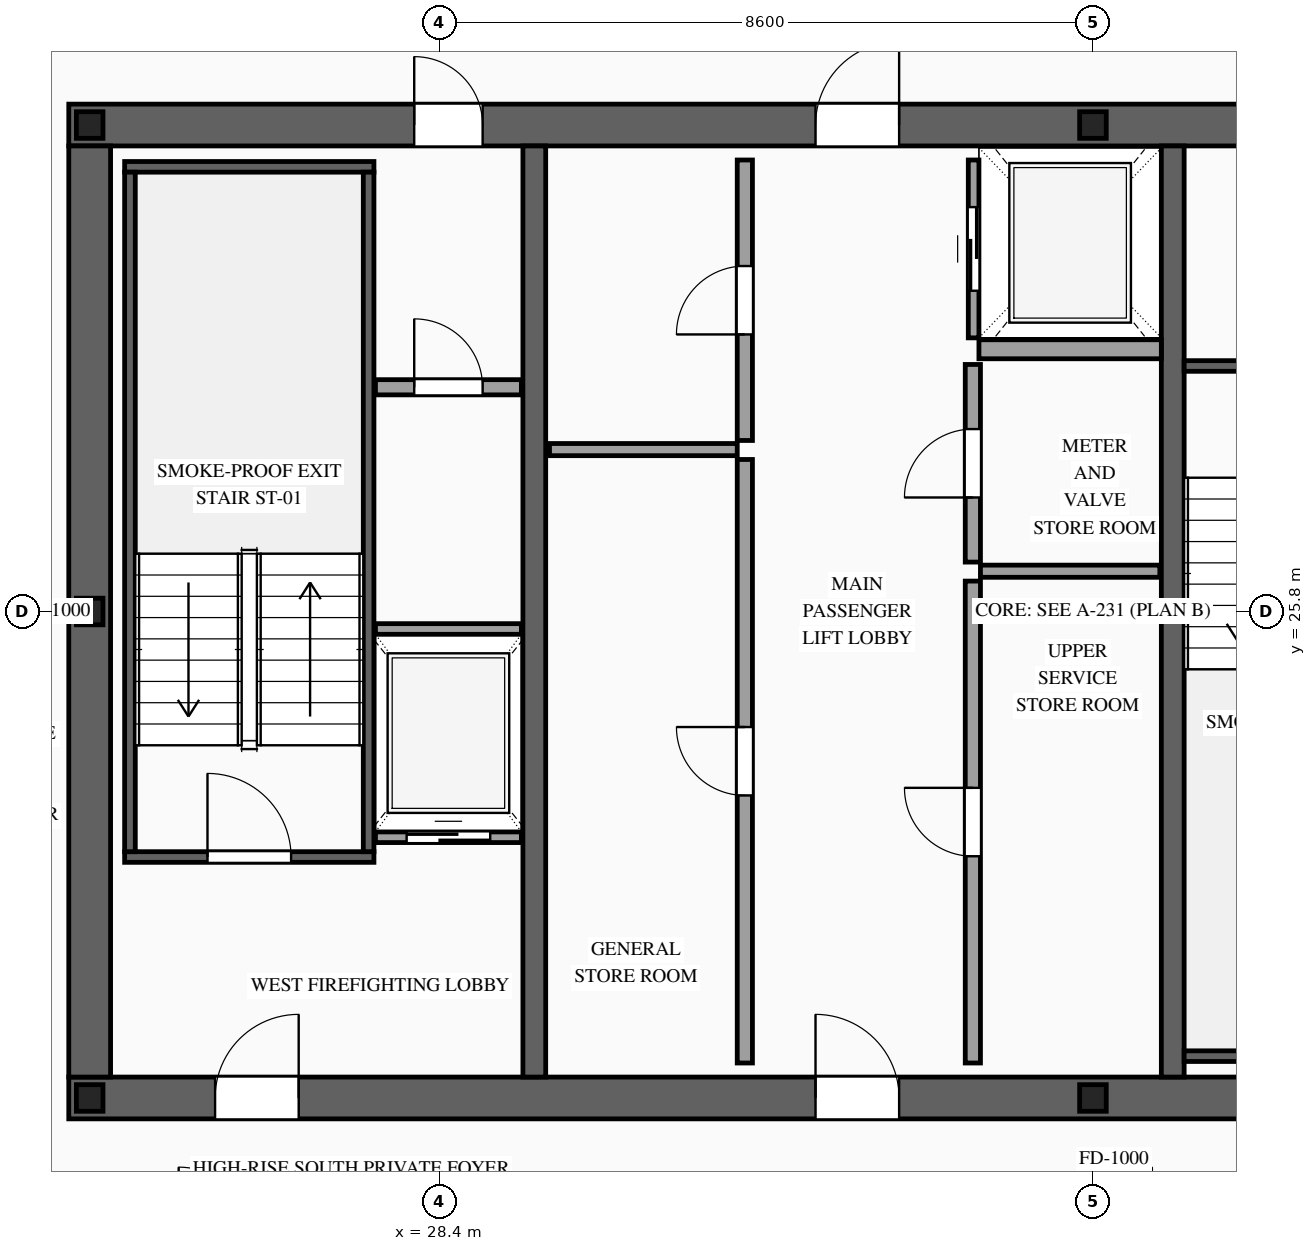
"""IFC4 building model, lengths in metres.
Left out: names, types, materials, properties, quantities, classifications, styles, units other than length and angle.
Written with IfcOpenShell. Run it as: python <this file> out.ifc"""

import sys

from ifc_helpers import new_model, si_unit, direction, frame, frame_2d, origin, origin_2d, place, context, subcontext, project, spatial, rectangle, i_section, extrude, source, transform, mapped, element, fill, save


model = new_model("IFC4")
c1 = context("Model", 3, precision=1e-05, world=origin(), true_north=direction((0.0, 1.0)))
c2 = subcontext(c1, "Body", "Model", "MODEL_VIEW")
j1 = project(units=[si_unit("LENGTHUNIT", "METRE"), si_unit("PLANEANGLEUNIT", "RADIAN")], contexts=[c1])
p1 = place(None, origin())
s1 = spatial("IfcSite", under=j1, at=p1, CompositionType="ELEMENT")
p2 = place(p1, origin())
s2 = spatial("IfcBuilding", under=s1, at=p2, CompositionType="ELEMENT")
p3 = place(p2, frame((0.0, 0.0, 268.1)))
s3 = spatial("IfcBuildingStorey", under=s2, at=p3, CompositionType="ELEMENT", Elevation=268.1)
p4 = place(p3, frame((23.525, 19.4, 0.0), z_axis=(0.0, 0.0, 1.0), x_axis=(1.0, 0.0, 0.0)))
e1 = element("IfcWall", 1, at=p4, inside=s3, PredefinedType="SHEAR", context=c2, shape_type="SweptSolid", body=[
    extrude(rectangle(XDim=26.95, YDim=0.55, at=frame_2d((13.475, 0.0))), origin(), (0.0, 0.0, 1.0), 3.5),
])
p5 = place(p4, frame((1.925, 0.0, 0.0)))
e2 = element("IfcOpeningElement", 2, at=p5, cuts=e1, PredefinedType="OPENING", context=c2, shape_type="SweptSolid", body=[
    extrude(rectangle(XDim=1.1, YDim=2.2, at=frame_2d((0.55, 1.1))), frame((0.0, 0.29, 0.0), z_axis=(0.0, -1.0, 0.0), x_axis=(1.0, 0.0, 0.0)), (0.0, 0.0, 1.0), 0.58),
])
p6 = place(p4, frame((9.825, 0.0, 0.0)))
e3 = element("IfcOpeningElement", 3, at=p6, cuts=e1, PredefinedType="OPENING", context=c2, shape_type="SweptSolid", body=[
    extrude(rectangle(XDim=1.1, YDim=2.2, at=frame_2d((0.55, 1.1))), frame((0.0, 0.29, 0.0), z_axis=(0.0, -1.0, 0.0), x_axis=(1.0, 0.0, 0.0)), (0.0, 0.0, 1.0), 0.58),
])
p7 = place(p4, frame((23.025, 0.0, 0.0)))
e4 = element("IfcOpeningElement", 4, at=p7, cuts=e1, PredefinedType="OPENING", context=c2, shape_type="SweptSolid", body=[
    extrude(rectangle(XDim=1.1, YDim=2.2, at=frame_2d((0.55, 1.1))), frame((0.0, 0.29, 0.0), z_axis=(0.0, -1.0, 0.0), x_axis=(1.0, 0.0, 0.0)), (0.0, 0.0, 1.0), 0.58),
])
p8 = place(p4, frame((19.645, 0.0, 0.0)))
e5 = element("IfcOpeningElement", 5, at=p8, cuts=e1, PredefinedType="OPENING", context=c2, shape_type="SweptSolid", body=[
    extrude(rectangle(XDim=0.9, YDim=2.15, at=frame_2d((0.45, 1.075))), frame((0.0, 0.29, 0.0), z_axis=(0.0, -1.0, 0.0), x_axis=(1.0, 0.0, 0.0)), (0.0, 0.0, 1.0), 0.58),
])
p9 = place(p4, frame((18.205, 0.0, 0.0)))
e6 = element("IfcOpeningElement", 6, at=p9, cuts=e1, PredefinedType="OPENING", context=c2, shape_type="SweptSolid", body=[
    extrude(rectangle(XDim=0.9, YDim=2.15, at=frame_2d((0.45, 1.075))), frame((0.0, 0.29, 0.0), z_axis=(0.0, -1.0, 0.0), x_axis=(1.0, 0.0, 0.0)), (0.0, 0.0, 1.0), 0.58),
])
p10 = place(p3, frame((23.525, 32.2, 0.0), z_axis=(0.0, 0.0, 1.0), x_axis=(1.0, 0.0, 0.0)))
e7 = element("IfcWall", 7, at=p10, inside=s3, PredefinedType="SHEAR", context=c2, shape_type="SweptSolid", body=[
    extrude(rectangle(XDim=26.95, YDim=0.55, at=frame_2d((13.475, 0.0))), origin(), (0.0, 0.0, 1.0), 3.5),
])
p11 = place(p10, frame((4.545, 0.0, 0.0)))
e8 = element("IfcOpeningElement", 8, at=p11, cuts=e7, PredefinedType="OPENING", context=c2, shape_type="SweptSolid", body=[
    extrude(rectangle(XDim=0.9, YDim=2.15, at=frame_2d((0.45, 1.075))), frame((0.0, 0.29, 0.0), z_axis=(0.0, -1.0, 0.0), x_axis=(1.0, 0.0, 0.0)), (0.0, 0.0, 1.0), 0.58),
])
p12 = place(p10, frame((9.825, 0.0, 0.0)))
e9 = element("IfcOpeningElement", 9, at=p12, cuts=e7, PredefinedType="OPENING", context=c2, shape_type="SweptSolid", body=[
    extrude(rectangle(XDim=1.1, YDim=2.2, at=frame_2d((0.55, 1.1))), frame((0.0, 0.29, 0.0), z_axis=(0.0, -1.0, 0.0), x_axis=(1.0, 0.0, 0.0)), (0.0, 0.0, 1.0), 0.58),
])
p13 = place(p10, frame((15.675, 0.0, 0.0)))
e10 = element("IfcOpeningElement", 10, at=p13, cuts=e7, PredefinedType="OPENING", context=c2, shape_type="SweptSolid", body=[
    extrude(rectangle(XDim=1.1, YDim=2.2, at=frame_2d((0.55, 1.1))), frame((0.0, 0.29, 0.0), z_axis=(0.0, -1.0, 0.0), x_axis=(1.0, 0.0, 0.0)), (0.0, 0.0, 1.0), 0.58),
])
p14 = place(p10, frame((18.775, 0.0, 0.0)))
e11 = element("IfcOpeningElement", 11, at=p14, cuts=e7, PredefinedType="OPENING", context=c2, shape_type="SweptSolid", body=[
    extrude(rectangle(XDim=1.1, YDim=2.2, at=frame_2d((0.55, 1.1))), frame((0.0, 0.29, 0.0), z_axis=(0.0, -1.0, 0.0), x_axis=(1.0, 0.0, 0.0)), (0.0, 0.0, 1.0), 0.58),
])
m1 = source(origin(), c2, "Body", "SweptSolid", [
    extrude(rectangle(XDim=12.25, YDim=0.55, at=frame_2d((6.125, 0.0))), origin(), (0.0, 0.0, 1.0), 3.5),
])
p15 = place(p3, frame((23.8, 19.675, 0.0), z_axis=(0.0, 0.0, 1.0), x_axis=(0.0, 1.0, 0.0)))
e12 = element("IfcWall", 12, at=p15, inside=s3, PredefinedType="SHEAR", context=c2, shape_type="MappedRepresentation", body=[
    mapped(m1, transform((0.0, 0.0, 0.0), scale=1.0)),
])
m2 = source(origin(), c2, "Body", "SweptSolid", [
    extrude(rectangle(XDim=12.25, YDim=0.3, at=frame_2d((6.125, 0.0))), origin(), (0.0, 0.0, 1.0), 3.5),
])
for number, where, z_axis, x_axis in (
    (13, (29.65, 19.675, 0.0), (0.0, 0.0, 1.0), (0.0, 1.0, 0.0)),
    (14, (38.05, 19.675, 0.0), (0.0, 0.0, 1.0), (0.0, 1.0, 0.0)),
):
    element("IfcWall", number, at=place(p3, frame(where, z_axis=z_axis, x_axis=x_axis)), inside=s3, PredefinedType="SOLIDWALL", context=c2, shape_type="MappedRepresentation", body=[
        mapped(m2, transform((0.0, 0.0, 0.0), scale=1.0)),
    ])
m3 = source(origin(), c2, "Body", "SweptSolid", [
    extrude(i_section(OverallWidth=0.35, OverallDepth=0.35, WebThickness=0.012, FlangeThickness=0.019, at=origin_2d()), origin(), (0.0, 0.0, 1.0), 3.5),
])
for number, where, z_axis, x_axis in (
    (15, (23.8, 19.4, 0.0), (0.0, 0.0, 1.0), (1.0, 0.0, 0.0)),
    (16, (37.0, 19.4, 0.0), (0.0, 0.0, 1.0), (1.0, 0.0, 0.0)),
    (17, (23.8, 25.8, 0.0), (0.0, 0.0, 1.0), (1.0, 0.0, 0.0)),
    (18, (23.8, 32.2, 0.0), (0.0, 0.0, 1.0), (1.0, 0.0, 0.0)),
    (19, (37.0, 32.2, 0.0), (0.0, 0.0, 1.0), (1.0, 0.0, 0.0)),
):
    element("IfcColumn", number, at=place(p3, frame(where, z_axis=z_axis, x_axis=x_axis)), inside=s3, PredefinedType="COLUMN", context=c2, shape_type="MappedRepresentation", body=[
        mapped(m3, transform((0.0, 0.0, 0.0), scale=1.0)),
    ])
p16 = place(p3, frame((27.56, 22.83, 0.0), z_axis=(0.0, 0.0, 1.0), x_axis=(1.0, 0.0, 0.0)))
e20 = element("IfcWall", 20, at=p16, inside=s3, PredefinedType="SOLIDWALL", context=c2, shape_type="SweptSolid", body=[
    extrude(rectangle(XDim=1.92, YDim=0.14, at=frame_2d((0.96, 0.0))), origin(), (0.0, 0.0, 1.0), 3.28),
])
p17 = place(p16, frame((0.41, 0.0, 0.0)))
e21 = element("IfcOpeningElement", 21, at=p17, cuts=e20, PredefinedType="OPENING", context=c2, shape_type="SweptSolid", body=[
    extrude(rectangle(XDim=1.1, YDim=2.2, at=frame_2d((0.55, 1.1))), frame((0.0, 0.085, 0.0), z_axis=(0.0, -1.0, 0.0), x_axis=(1.0, 0.0, 0.0)), (0.0, 0.0, 1.0), 0.17),
])
m4 = source(origin(), c2, "Body", "SweptSolid", [
    extrude(rectangle(XDim=1.92, YDim=0.14, at=frame_2d((0.96, 0.0))), origin(), (0.0, 0.0, 1.0), 3.28),
])
p18 = place(p3, frame((27.56, 25.57, 0.0), z_axis=(0.0, 0.0, 1.0), x_axis=(1.0, 0.0, 0.0)))
e22 = element("IfcWall", 22, at=p18, inside=s3, PredefinedType="SOLIDWALL", context=c2, shape_type="MappedRepresentation", body=[
    mapped(m4, transform((0.0, 0.0, 0.0), scale=1.0)),
])
p19 = place(p3, frame((35.43, 29.4, 0.0), z_axis=(0.0, 0.0, 1.0), x_axis=(0.0, 1.0, 0.0)))
e23 = element("IfcWall", 23, at=p19, inside=s3, PredefinedType="SOLIDWALL", context=c2, shape_type="SweptSolid", body=[
    extrude(rectangle(XDim=2.34, YDim=0.14, at=frame_2d((1.17, 0.0))), origin(), (0.0, 0.0, 1.0), 3.28),
])
p20 = place(p19, frame((0.62, 0.0, 0.0)))
e24 = element("IfcOpeningElement", 24, at=p20, cuts=e23, PredefinedType="OPENING", context=c2, shape_type="SweptSolid", body=[
    extrude(rectangle(XDim=1.1, YDim=2.2, at=frame_2d((0.55, 1.1))), frame((0.0, 0.085, 0.0), z_axis=(0.0, -1.0, 0.0), x_axis=(1.0, 0.0, 0.0)), (0.0, 0.0, 1.0), 0.17),
])
m5 = source(origin(), c2, "Body", "SweptSolid", [
    extrude(rectangle(XDim=2.4, YDim=0.25, at=frame_2d((1.2, 0.0))), origin(), (0.0, 0.0, 1.0), 3.28),
])
p21 = place(p3, frame((35.5, 29.25, 0.0), z_axis=(0.0, 0.0, 1.0), x_axis=(1.0, 0.0, 0.0)))
e25 = element("IfcWall", 25, at=p21, inside=s3, PredefinedType="SOLIDWALL", context=c2, shape_type="MappedRepresentation", body=[
    mapped(m5, transform((0.0, 0.0, 0.0), scale=1.0)),
])
p22 = place(p3, frame((24.26, 22.57, 0.0), z_axis=(0.0, 0.0, 1.0), x_axis=(1.0, 0.0, 0.0)))
e26 = element("IfcWall", 26, at=p22, inside=s3, PredefinedType="SOLIDWALL", context=c2, shape_type="SweptSolid", body=[
    extrude(rectangle(XDim=3.28, YDim=0.14, at=frame_2d((1.64, 0.0))), origin(), (0.0, 0.0, 1.0), 3.28),
])
p23 = place(p22, frame((1.09, 0.0, 0.0)))
e27 = element("IfcOpeningElement", 27, at=p23, cuts=e26, PredefinedType="OPENING", context=c2, shape_type="SweptSolid", body=[
    extrude(rectangle(XDim=1.1, YDim=2.2, at=frame_2d((0.55, 1.1))), frame((0.0, 0.085, 0.0), z_axis=(0.0, -1.0, 0.0), x_axis=(1.0, 0.0, 0.0)), (0.0, 0.0, 1.0), 0.17),
])
m6 = source(origin(), c2, "Body", "SweptSolid", [
    extrude(rectangle(XDim=3.28, YDim=0.14, at=frame_2d((1.64, 0.0))), origin(), (0.0, 0.0, 1.0), 3.28),
])
p24 = place(p3, frame((24.26, 31.65, 0.0), z_axis=(0.0, 0.0, 1.0), x_axis=(1.0, 0.0, 0.0)))
e28 = element("IfcWall", 28, at=p24, inside=s3, PredefinedType="SOLIDWALL", context=c2, shape_type="MappedRepresentation", body=[
    mapped(m6, transform((0.0, 0.0, 0.0), scale=1.0)),
])
m7 = source(origin(), c2, "Body", "SweptSolid", [
    extrude(rectangle(XDim=8.94, YDim=0.14, at=frame_2d((4.47, 0.0))), origin(), (0.0, 0.0, 1.0), 3.28),
])
for number, where, z_axis, x_axis in (
    (29, (24.33, 22.64, 0.0), (0.0, 0.0, 1.0), (0.0, 1.0, 0.0)),
    (30, (27.47, 22.64, 0.0), (0.0, 0.0, 1.0), (0.0, 1.0, 0.0)),
):
    element("IfcWall", number, at=place(p3, frame(where, z_axis=z_axis, x_axis=x_axis)), inside=s3, PredefinedType="SOLIDWALL", context=c2, shape_type="MappedRepresentation", body=[
        mapped(m7, transform((0.0, 0.0, 0.0), scale=1.0)),
    ])
p25 = place(p3, frame((38.2, 29.03, 0.0), z_axis=(0.0, 0.0, 1.0), x_axis=(1.0, 0.0, 0.0)))
e31 = element("IfcWall", 31, at=p25, inside=s3, PredefinedType="SOLIDWALL", context=c2, shape_type="SweptSolid", body=[
    extrude(rectangle(XDim=3.14, YDim=0.14, at=frame_2d((1.57, 0.0))), origin(), (0.0, 0.0, 1.0), 3.28),
])
p26 = place(p25, frame((1.02, 0.0, 0.0)))
e32 = element("IfcOpeningElement", 32, at=p26, cuts=e31, PredefinedType="OPENING", context=c2, shape_type="SweptSolid", body=[
    extrude(rectangle(XDim=1.1, YDim=2.2, at=frame_2d((0.55, 1.1))), frame((0.0, 0.085, 0.0), z_axis=(0.0, -1.0, 0.0), x_axis=(1.0, 0.0, 0.0)), (0.0, 0.0, 1.0), 0.17),
])
m8 = source(origin(), c2, "Body", "SweptSolid", [
    extrude(rectangle(XDim=3.14, YDim=0.14, at=frame_2d((1.57, 0.0))), origin(), (0.0, 0.0, 1.0), 3.28),
])
p27 = place(p3, frame((38.2, 19.95, 0.0), z_axis=(0.0, 0.0, 1.0), x_axis=(1.0, 0.0, 0.0)))
e33 = element("IfcWall", 33, at=p27, inside=s3, PredefinedType="SOLIDWALL", context=c2, shape_type="MappedRepresentation", body=[
    mapped(m8, transform((0.0, 0.0, 0.0), scale=1.0)),
])
p28 = place(p3, frame((27.56, 28.75, 0.0), z_axis=(0.0, 0.0, 1.0), x_axis=(1.0, 0.0, 0.0)))
e34 = element("IfcWall", 34, at=p28, inside=s3, PredefinedType="PARTITIONING", context=c2, shape_type="SweptSolid", body=[
    extrude(rectangle(XDim=1.92, YDim=0.2, at=frame_2d((0.96, 0.0))), origin(), (0.0, 0.0, 1.0), 3.28),
])
p29 = place(p28, frame((0.51, 0.0, 0.0)))
e35 = element("IfcOpeningElement", 35, at=p29, cuts=e34, PredefinedType="OPENING", context=c2, shape_type="SweptSolid", body=[
    extrude(rectangle(XDim=0.9, YDim=2.15, at=frame_2d((0.45, 1.075))), frame((0.0, 0.115, 0.0), z_axis=(0.0, -1.0, 0.0), x_axis=(1.0, 0.0, 0.0)), (0.0, 0.0, 1.0), 0.23),
])
p30 = place(p3, frame((32.42, 19.86, 0.0), z_axis=(0.0, 0.0, 1.0), x_axis=(0.0, 1.0, 0.0)))
e36 = element("IfcWall", 36, at=p30, inside=s3, PredefinedType="PARTITIONING", context=c2, shape_type="SweptSolid", body=[
    extrude(rectangle(XDim=7.94, YDim=0.2, at=frame_2d((3.97, 0.0))), origin(), (0.0, 0.0, 1.0), 3.28),
])
p31 = place(p30, frame((3.52, 0.0, 0.0)))
e37 = element("IfcOpeningElement", 37, at=p31, cuts=e36, PredefinedType="OPENING", context=c2, shape_type="SweptSolid", body=[
    extrude(rectangle(XDim=0.9, YDim=2.15, at=frame_2d((0.45, 1.075))), frame((0.0, 0.115, 0.0), z_axis=(0.0, -1.0, 0.0), x_axis=(1.0, 0.0, 0.0)), (0.0, 0.0, 1.0), 0.23),
])
p32 = place(p3, frame((32.42, 28.05, 0.0), z_axis=(0.0, 0.0, 1.0), x_axis=(0.0, 1.0, 0.0)))
e38 = element("IfcWall", 38, at=p32, inside=s3, PredefinedType="PARTITIONING", context=c2, shape_type="SweptSolid", body=[
    extrude(rectangle(XDim=3.69, YDim=0.2, at=frame_2d((1.845, 0.0))), origin(), (0.0, 0.0, 1.0), 3.28),
])
p33 = place(p32, frame((1.395, 0.0, 0.0)))
e39 = element("IfcOpeningElement", 39, at=p33, cuts=e38, PredefinedType="OPENING", context=c2, shape_type="SweptSolid", body=[
    extrude(rectangle(XDim=0.9, YDim=2.15, at=frame_2d((0.45, 1.075))), frame((0.0, 0.115, 0.0), z_axis=(0.0, -1.0, 0.0), x_axis=(1.0, 0.0, 0.0)), (0.0, 0.0, 1.0), 0.23),
])
m9 = source(origin(), c2, "Body", "SweptSolid", [
    extrude(rectangle(XDim=2.47, YDim=0.16, at=frame_2d((1.235, 0.0))), origin(), (0.0, 0.0, 1.0), 3.28),
])
p34 = place(p3, frame((29.85, 27.93, 0.0), z_axis=(0.0, 0.0, 1.0), x_axis=(1.0, 0.0, 0.0)))
e40 = element("IfcWall", 40, at=p34, inside=s3, PredefinedType="PARTITIONING", context=c2, shape_type="MappedRepresentation", body=[
    mapped(m9, transform((0.0, 0.0, 0.0), scale=1.0)),
])
p35 = place(p3, frame((35.42, 19.86, 0.0), z_axis=(0.0, 0.0, 1.0), x_axis=(0.0, 1.0, 0.0)))
e41 = element("IfcWall", 41, at=p35, inside=s3, PredefinedType="PARTITIONING", context=c2, shape_type="SweptSolid", body=[
    extrude(rectangle(XDim=6.34, YDim=0.2, at=frame_2d((3.17, 0.0))), origin(), (0.0, 0.0, 1.0), 3.28),
])
p36 = place(p35, frame((2.72, 0.0, 0.0)))
e42 = element("IfcOpeningElement", 42, at=p36, cuts=e41, PredefinedType="OPENING", context=c2, shape_type="SweptSolid", body=[
    extrude(rectangle(XDim=0.9, YDim=2.15, at=frame_2d((0.45, 1.075))), frame((0.0, 0.115, 0.0), z_axis=(0.0, -1.0, 0.0), x_axis=(1.0, 0.0, 0.0)), (0.0, 0.0, 1.0), 0.23),
])
p37 = place(p3, frame((35.42, 26.45, 0.0), z_axis=(0.0, 0.0, 1.0), x_axis=(0.0, 1.0, 0.0)))
e43 = element("IfcWall", 43, at=p37, inside=s3, PredefinedType="PARTITIONING", context=c2, shape_type="SweptSolid", body=[
    extrude(rectangle(XDim=2.6, YDim=0.2, at=frame_2d((1.3, 0.0))), origin(), (0.0, 0.0, 1.0), 3.28),
])
p38 = place(p37, frame((0.85, 0.0, 0.0)))
e44 = element("IfcOpeningElement", 44, at=p38, cuts=e43, PredefinedType="OPENING", context=c2, shape_type="SweptSolid", body=[
    extrude(rectangle(XDim=0.9, YDim=2.15, at=frame_2d((0.45, 1.075))), frame((0.0, 0.115, 0.0), z_axis=(0.0, -1.0, 0.0), x_axis=(1.0, 0.0, 0.0)), (0.0, 0.0, 1.0), 0.23),
])
m10 = source(origin(), c2, "Body", "SweptSolid", [
    extrude(rectangle(XDim=2.36, YDim=0.16, at=frame_2d((1.18, 0.0))), origin(), (0.0, 0.0, 1.0), 3.28),
])
p39 = place(p3, frame((35.52, 26.33, 0.0), z_axis=(0.0, 0.0, 1.0), x_axis=(1.0, 0.0, 0.0)))
e45 = element("IfcWall", 45, at=p39, inside=s3, PredefinedType="PARTITIONING", context=c2, shape_type="MappedRepresentation", body=[
    mapped(m10, transform((0.0, 0.0, 0.0), scale=1.0)),
])
m11 = source(origin(), c2, "Body", "SweptSolid", [
    extrude(rectangle(XDim=1.1, YDim=2.2, at=frame_2d((0.55, 1.1))), frame((0.0, 0.025, 0.0), z_axis=(0.0, -1.0, 0.0), x_axis=(1.0, 0.0, 0.0)), (0.0, 0.0, 1.0), 0.05),
])
p40 = place(p17, origin())
e46 = element("IfcDoor", 46, at=p40, inside=s3, OperationType="SLIDING_TO_LEFT", PredefinedType="DOOR", context=c2, shape_type="MappedRepresentation", body=[
    mapped(m11, transform((0.0, 0.0, 0.0), scale=1.0)),
])
fill(e21, e46)
p41 = place(p20, origin())
e47 = element("IfcDoor", 47, at=p41, inside=s3, OperationType="SLIDING_TO_RIGHT", PredefinedType="DOOR", context=c2, shape_type="MappedRepresentation", body=[
    mapped(m11, transform((0.0, 0.0, 0.0), scale=1.0)),
])
fill(e24, e47)
m12 = source(origin(), c2, "Body", "SweptSolid", [
    extrude(rectangle(XDim=1.1, YDim=2.2, at=frame_2d((0.55, 1.1))), frame((0.0, 0.025, 0.0), z_axis=(0.0, -1.0, 0.0), x_axis=(1.0, 0.0, 0.0)), (0.0, 0.0, 1.0), 0.05),
])
p42 = place(p23, origin())
e48 = element("IfcDoor", 48, at=p42, inside=s3, OperationType="SINGLE_SWING_LEFT", PredefinedType="DOOR", context=c2, shape_type="MappedRepresentation", body=[
    mapped(m12, transform((0.0, 0.0, 0.0), scale=1.0)),
])
fill(e27, e48)
p43 = place(p5, origin())
e49 = element("IfcDoor", 49, at=p43, inside=s3, OperationType="SINGLE_SWING_RIGHT", PredefinedType="DOOR", context=c2, shape_type="MappedRepresentation", body=[
    mapped(m12, transform((0.0, 0.0, 0.0), scale=1.0)),
])
fill(e2, e49)
p44 = place(p6, origin())
e50 = element("IfcDoor", 50, at=p44, inside=s3, OperationType="SINGLE_SWING_LEFT", PredefinedType="DOOR", context=c2, shape_type="MappedRepresentation", body=[
    mapped(m12, transform((0.0, 0.0, 0.0), scale=1.0)),
])
fill(e3, e50)
m13 = source(origin(), c2, "Body", "SweptSolid", [
    extrude(rectangle(XDim=0.9, YDim=2.15, at=frame_2d((0.45, 1.075))), frame((0.0, 0.025, 0.0), z_axis=(0.0, -1.0, 0.0), x_axis=(1.0, 0.0, 0.0)), (0.0, 0.0, 1.0), 0.05),
])
p45 = place(p11, origin())
e51 = element("IfcDoor", 51, at=p45, inside=s3, OperationType="SINGLE_SWING_LEFT", PredefinedType="DOOR", context=c2, shape_type="MappedRepresentation", body=[
    mapped(m13, transform((0.0, 0.0, 0.0), scale=1.0)),
])
fill(e8, e51)
p46 = place(p12, origin())
e52 = element("IfcDoor", 52, at=p46, inside=s3, OperationType="SINGLE_SWING_RIGHT", PredefinedType="DOOR", context=c2, shape_type="MappedRepresentation", body=[
    mapped(m12, transform((0.0, 0.0, 0.0), scale=1.0)),
])
fill(e9, e52)
p47 = place(p29, origin())
e53 = element("IfcDoor", 53, at=p47, inside=s3, OperationType="SINGLE_SWING_LEFT", PredefinedType="DOOR", context=c2, shape_type="MappedRepresentation", body=[
    mapped(m13, transform((0.0, 0.0, 0.0), scale=1.0)),
])
fill(e35, e53)
p48 = place(p31, origin())
e54 = element("IfcDoor", 54, at=p48, inside=s3, OperationType="SINGLE_SWING_RIGHT", PredefinedType="DOOR", context=c2, shape_type="MappedRepresentation", body=[
    mapped(m13, transform((0.0, 0.0, 0.0), scale=1.0)),
])
fill(e37, e54)
p49 = place(p33, origin())
e55 = element("IfcDoor", 55, at=p49, inside=s3, OperationType="SINGLE_SWING_LEFT", PredefinedType="DOOR", context=c2, shape_type="MappedRepresentation", body=[
    mapped(m13, transform((0.0, 0.0, 0.0), scale=1.0)),
])
fill(e39, e55)
p50 = place(p36, origin())
e56 = element("IfcDoor", 56, at=p50, inside=s3, OperationType="SINGLE_SWING_RIGHT", PredefinedType="DOOR", context=c2, shape_type="MappedRepresentation", body=[
    mapped(m13, transform((0.0, 0.0, 0.0), scale=1.0)),
])
fill(e42, e56)
p51 = place(p38, origin())
e57 = element("IfcDoor", 57, at=p51, inside=s3, OperationType="SINGLE_SWING_LEFT", PredefinedType="DOOR", context=c2, shape_type="MappedRepresentation", body=[
    mapped(m13, transform((0.0, 0.0, 0.0), scale=1.0)),
])
fill(e44, e57)
save(model, sys.argv[1])
